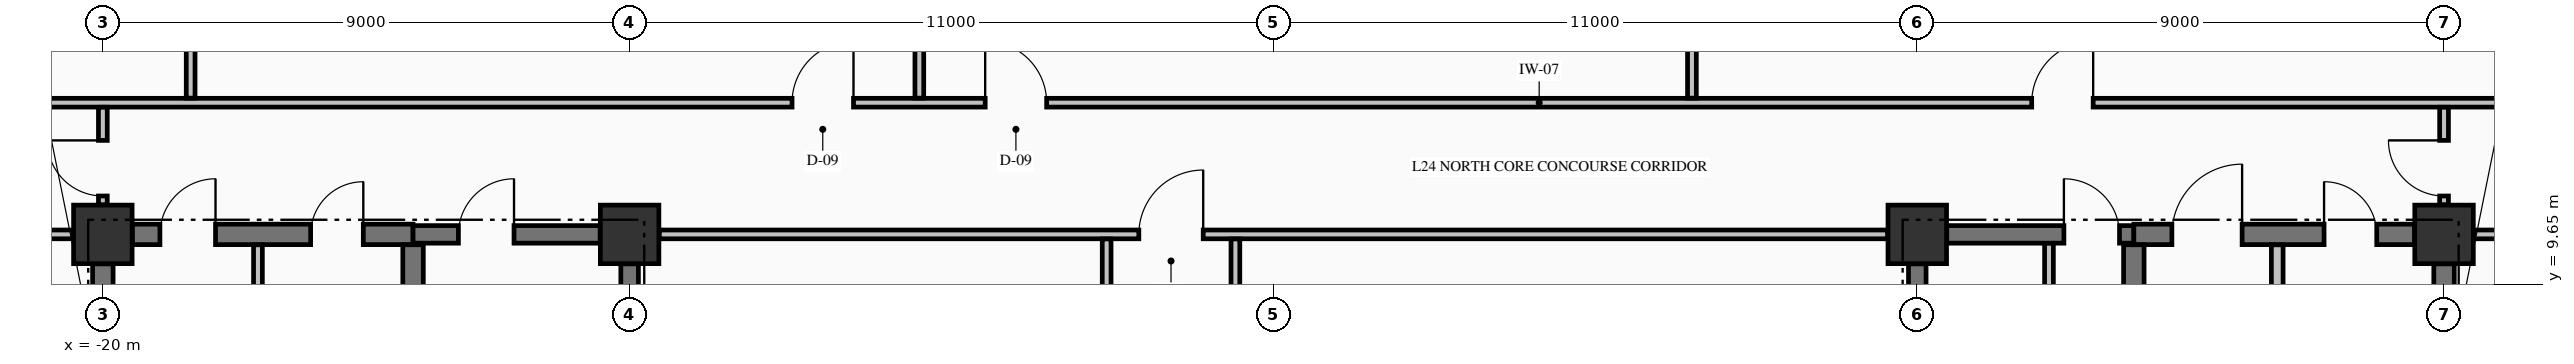
"""IFC4 building model, lengths in metres.
Left out: names, types, materials, properties, quantities, classifications, styles, units other than length and angle.
Written with IfcOpenShell. Run it as: python <this file> out.ifc"""

import sys

from ifc_helpers import new_model, si_unit, direction, frame, frame_2d, origin, origin_2d, place, context, subcontext, project, spatial, rectangle, extrude, element, fill, save


model = new_model("IFC4")
c1 = context("Model", 3, precision=1e-05, world=origin(), true_north=direction((0.0, 1.0)))
c2 = subcontext(c1, "Body", "Model", "MODEL_VIEW")
j1 = project(units=[si_unit("LENGTHUNIT", "METRE"), si_unit("PLANEANGLEUNIT", "RADIAN")], contexts=[c1])
p1 = place(None, origin())
s1 = spatial("IfcSite", under=j1, at=p1, CompositionType="ELEMENT")
p2 = place(p1, origin())
s2 = spatial("IfcBuilding", under=s1, at=p2, CompositionType="ELEMENT")
p3 = place(p2, frame((0.0, 0.0, 98.5)))
s3 = spatial("IfcBuildingStorey", under=s2, at=p3, CompositionType="ELEMENT", Elevation=98.5)
for number, where, z_axis, x_axis in (
    (1, (-20.0, 10.5, -0.275), (0.0, 0.0, 1.0), (1.0, 0.0, 0.0)),
    (2, (-11.0, 10.5, -0.275), (0.0, 0.0, 1.0), (1.0, 0.0, 0.0)),
    (3, (11.0, 10.5, -0.275), (0.0, 0.0, 1.0), (1.0, 0.0, 0.0)),
    (4, (20.0, 10.5, -0.275), (0.0, 0.0, 1.0), (1.0, 0.0, 0.0)),
):
    element("IfcColumn", number, at=place(p3, frame(where, z_axis=z_axis, x_axis=x_axis)), inside=s3, PredefinedType="COLUMN", context=c2, shape_type="SweptSolid", body=[
        extrude(rectangle(XDim=1.0, YDim=1.0, at=origin_2d()), origin(), (0.0, 0.0, 1.0), 3.595),
    ])
p4 = place(p3, frame((-19.496, 10.5, 0.0), z_axis=(0.0, 0.0, 1.0), x_axis=(1.0, 0.0, 0.0)))
e5 = element("IfcWall", 5, at=p4, inside=s3, PredefinedType="SHEAR", context=c2, shape_type="SweptSolid", body=[
    extrude(rectangle(XDim=4.796, YDim=0.35, at=frame_2d((2.398, 0.0))), origin(), (0.0, 0.0, 1.0), 3.32),
])
p5 = place(p4, frame((0.471, 0.0, 0.0)))
e6 = element("IfcOpeningElement", 6, at=p5, cuts=e5, PredefinedType="OPENING", context=c2, shape_type="SweptSolid", body=[
    extrude(rectangle(XDim=0.95, YDim=2.15, at=frame_2d((0.475, 1.075))), frame((0.0, 0.185, 0.0), z_axis=(0.0, -1.0, 0.0), x_axis=(1.0, 0.0, 0.0)), (0.0, 0.0, 1.0), 0.37),
])
p6 = place(p4, frame((3.046, 0.0, 0.0)))
e7 = element("IfcOpeningElement", 7, at=p6, cuts=e5, PredefinedType="OPENING", context=c2, shape_type="SweptSolid", body=[
    extrude(rectangle(XDim=0.9, YDim=2.15, at=frame_2d((0.45, 1.075))), frame((0.0, 0.185, 0.0), z_axis=(0.0, -1.0, 0.0), x_axis=(1.0, 0.0, 0.0)), (0.0, 0.0, 1.0), 0.37),
])
p7 = place(p3, frame((-14.7, 10.5, 0.0), z_axis=(0.0, 0.0, 1.0), x_axis=(1.0, 0.0, 0.0)))
e8 = element("IfcWall", 8, at=p7, inside=s3, PredefinedType="SHEAR", context=c2, shape_type="SweptSolid", body=[
    extrude(rectangle(XDim=3.196, YDim=0.3, at=frame_2d((1.598, 0.0))), origin(), (0.0, 0.0, 1.0), 3.32),
])
p8 = place(p7, frame((0.775, 0.0, 0.0)))
e9 = element("IfcOpeningElement", 9, at=p8, cuts=e8, PredefinedType="OPENING", context=c2, shape_type="SweptSolid", body=[
    extrude(rectangle(XDim=0.95, YDim=2.15, at=frame_2d((0.475, 1.075))), frame((0.0, 0.16, 0.0), z_axis=(0.0, -1.0, 0.0), x_axis=(1.0, 0.0, 0.0)), (0.0, 0.0, 1.0), 0.32),
])
p9 = place(p3, frame((11.504, 10.5, 0.0), z_axis=(0.0, 0.0, 1.0), x_axis=(1.0, 0.0, 0.0)))
e10 = element("IfcWall", 10, at=p9, inside=s3, PredefinedType="SHEAR", context=c2, shape_type="SweptSolid", body=[
    extrude(rectangle(XDim=3.196, YDim=0.3, at=frame_2d((1.598, 0.0))), origin(), (0.0, 0.0, 1.0), 3.32),
])
p10 = place(p9, frame((2.001, 0.0, 0.0)))
e11 = element("IfcOpeningElement", 11, at=p10, cuts=e10, PredefinedType="OPENING", context=c2, shape_type="SweptSolid", body=[
    extrude(rectangle(XDim=0.95, YDim=2.15, at=frame_2d((0.475, 1.075))), frame((0.0, 0.16, 0.0), z_axis=(0.0, -1.0, 0.0), x_axis=(1.0, 0.0, 0.0)), (0.0, 0.0, 1.0), 0.32),
])
p11 = place(p3, frame((14.7, 10.5, 0.0), z_axis=(0.0, 0.0, 1.0), x_axis=(1.0, 0.0, 0.0)))
e12 = element("IfcWall", 12, at=p11, inside=s3, PredefinedType="SHEAR", context=c2, shape_type="SweptSolid", body=[
    extrude(rectangle(XDim=4.796, YDim=0.35, at=frame_2d((2.398, 0.0))), origin(), (0.0, 0.0, 1.0), 3.32),
])
p12 = place(p11, frame((0.65, 0.0, 0.0)))
e13 = element("IfcOpeningElement", 13, at=p12, cuts=e12, PredefinedType="OPENING", context=c2, shape_type="SweptSolid", body=[
    extrude(rectangle(XDim=1.2, YDim=2.15, at=frame_2d((0.6, 1.075))), frame((0.0, 0.185, 0.0), z_axis=(0.0, -1.0, 0.0), x_axis=(1.0, 0.0, 0.0)), (0.0, 0.0, 1.0), 0.37),
])
p13 = place(p11, frame((3.25, 0.0, 0.0)))
e14 = element("IfcOpeningElement", 14, at=p13, cuts=e12, PredefinedType="OPENING", context=c2, shape_type="SweptSolid", body=[
    extrude(rectangle(XDim=0.9, YDim=2.15, at=frame_2d((0.45, 1.075))), frame((0.0, 0.185, 0.0), z_axis=(0.0, -1.0, 0.0), x_axis=(1.0, 0.0, 0.0)), (0.0, 0.0, 1.0), 0.37),
])
p14 = place(p3, frame((-22.835, 10.5, 0.0), z_axis=(0.0, 0.0, 1.0), x_axis=(1.0, 0.0, 0.0)))
e15 = element("IfcWall", 15, at=p14, inside=s3, PredefinedType="PARTITIONING", context=c2, shape_type="SweptSolid", body=[
    extrude(rectangle(XDim=2.329, YDim=0.15, at=frame_2d((1.165, 0.0))), origin(), (0.0, 0.0, 1.0), 3.32),
])
p15 = place(p14, frame((0.86, 0.0, 0.0)))
e16 = element("IfcOpeningElement", 16, at=p15, cuts=e15, PredefinedType="OPENING", context=c2, shape_type="SweptSolid", body=[
    extrude(rectangle(XDim=0.95, YDim=2.15, at=frame_2d((0.475, 1.075))), frame((0.0, 0.085, 0.0), z_axis=(0.0, -1.0, 0.0), x_axis=(1.0, 0.0, 0.0)), (0.0, 0.0, 1.0), 0.17),
])
p16 = place(p3, frame((-10.494, 10.5, 0.0), z_axis=(0.0, 0.0, 1.0), x_axis=(1.0, 0.0, 0.0)))
e17 = element("IfcWall", 17, at=p16, inside=s3, PredefinedType="PARTITIONING", context=c2, shape_type="SweptSolid", body=[
    extrude(rectangle(XDim=20.988, YDim=0.15, at=frame_2d((10.494, 0.0))), origin(), (0.0, 0.0, 1.0), 3.32),
])
p17 = place(p16, frame((8.194, 0.0, 0.0)))
e18 = element("IfcOpeningElement", 18, at=p17, cuts=e17, PredefinedType="OPENING", context=c2, shape_type="SweptSolid", body=[
    extrude(rectangle(XDim=1.1, YDim=2.15, at=frame_2d((0.55, 1.075))), frame((0.0, 0.085, 0.0), z_axis=(0.0, -1.0, 0.0), x_axis=(1.0, 0.0, 0.0)), (0.0, 0.0, 1.0), 0.17),
])
p18 = place(p3, frame((20.506, 10.5, 0.0), z_axis=(0.0, 0.0, 1.0), x_axis=(1.0, 0.0, 0.0)))
e19 = element("IfcWall", 19, at=p18, inside=s3, PredefinedType="PARTITIONING", context=c2, shape_type="SweptSolid", body=[
    extrude(rectangle(XDim=7.329, YDim=0.15, at=frame_2d((3.665, 0.0))), origin(), (0.0, 0.0, 1.0), 3.32),
])
p19 = place(p18, frame((2.994, 0.0, 0.0)))
e20 = element("IfcOpeningElement", 20, at=p19, cuts=e19, PredefinedType="OPENING", context=c2, shape_type="SweptSolid", body=[
    extrude(rectangle(XDim=1.0, YDim=2.15, at=frame_2d((0.5, 1.075))), frame((0.0, 0.085, 0.0), z_axis=(0.0, -1.0, 0.0), x_axis=(1.0, 0.0, 0.0)), (0.0, 0.0, 1.0), 0.17),
])
p20 = place(p3, frame((-22.835, 12.75, 0.0), z_axis=(0.0, 0.0, 1.0), x_axis=(1.0, 0.0, 0.0)))
e21 = element("IfcWall", 21, at=p20, inside=s3, PredefinedType="PARTITIONING", context=c2, shape_type="SweptSolid", body=[
    extrude(rectangle(XDim=50.67, YDim=0.15, at=frame_2d((25.335, 0.0))), origin(), (0.0, 0.0, 1.0), 3.32),
])
p21 = place(p20, frame((14.61, 0.0, 0.0)))
e22 = element("IfcOpeningElement", 22, at=p21, cuts=e21, PredefinedType="OPENING", context=c2, shape_type="SweptSolid", body=[
    extrude(rectangle(XDim=1.05, YDim=2.15, at=frame_2d((0.525, 1.075))), frame((0.0, 0.085, 0.0), z_axis=(0.0, -1.0, 0.0), x_axis=(1.0, 0.0, 0.0)), (0.0, 0.0, 1.0), 0.17),
])
p22 = place(p20, frame((17.91, 0.0, 0.0)))
e23 = element("IfcOpeningElement", 23, at=p22, cuts=e21, PredefinedType="OPENING", context=c2, shape_type="SweptSolid", body=[
    extrude(rectangle(XDim=1.05, YDim=2.15, at=frame_2d((0.525, 1.075))), frame((0.0, 0.085, 0.0), z_axis=(0.0, -1.0, 0.0), x_axis=(1.0, 0.0, 0.0)), (0.0, 0.0, 1.0), 0.17),
])
p23 = place(p20, frame((35.79, 0.0, 0.0)))
e24 = element("IfcOpeningElement", 24, at=p23, cuts=e21, PredefinedType="OPENING", context=c2, shape_type="SweptSolid", body=[
    extrude(rectangle(XDim=1.05, YDim=2.15, at=frame_2d((0.525, 1.075))), frame((0.0, 0.085, 0.0), z_axis=(0.0, -1.0, 0.0), x_axis=(1.0, 0.0, 0.0)), (0.0, 0.0, 1.0), 0.17),
])
p24 = place(p3, frame((-20.0, 0.504, 0.0), z_axis=(0.0, 0.0, 1.0), x_axis=(0.0, 1.0, 0.0)))
e25 = element("IfcWall", 25, at=p24, inside=s3, PredefinedType="SHEAR", context=c2, shape_type="SweptSolid", body=[
    extrude(rectangle(XDim=9.492, YDim=0.35, at=frame_2d((4.746, 0.0))), origin(), (0.0, 0.0, 1.0), 3.32),
])
p25 = place(p3, frame((-14.7, 5.852, 0.0), z_axis=(0.0, 0.0, 1.0), x_axis=(0.0, 1.0, 0.0)))
e26 = element("IfcWall", 26, at=p25, inside=s3, PredefinedType="SHEAR", context=c2, shape_type="SweptSolid", body=[
    extrude(rectangle(XDim=4.471, YDim=0.35, at=frame_2d((2.235, 0.0))), origin(), (0.0, 0.0, 1.0), 3.32),
])
for number, where, z_axis, x_axis in (
    (27, (-11.0, 5.852, 0.0), (0.0, 0.0, 1.0), (0.0, 1.0, 0.0)),
    (28, (11.0, 5.852, 0.0), (0.0, 0.0, 1.0), (0.0, 1.0, 0.0)),
):
    element("IfcWall", number, at=place(p3, frame(where, z_axis=z_axis, x_axis=x_axis)), inside=s3, PredefinedType="SHEAR", context=c2, shape_type="SweptSolid", body=[
        extrude(rectangle(XDim=4.144, YDim=0.3, at=frame_2d((2.072, 0.0))), origin(), (0.0, 0.0, 1.0), 3.32),
    ])
p26 = place(p3, frame((14.7, 5.852, 0.0), z_axis=(0.0, 0.0, 1.0), x_axis=(0.0, 1.0, 0.0)))
e29 = element("IfcWall", 29, at=p26, inside=s3, PredefinedType="SHEAR", context=c2, shape_type="SweptSolid", body=[
    extrude(rectangle(XDim=4.471, YDim=0.35, at=frame_2d((2.235, 0.0))), origin(), (0.0, 0.0, 1.0), 3.32),
])
p27 = place(p3, frame((20.0, 5.377, 0.0), z_axis=(0.0, 0.0, 1.0), x_axis=(0.0, 1.0, 0.0)))
e30 = element("IfcWall", 30, at=p27, inside=s3, PredefinedType="SHEAR", context=c2, shape_type="SweptSolid", body=[
    extrude(rectangle(XDim=4.619, YDim=0.35, at=frame_2d((2.31, 0.0))), origin(), (0.0, 0.0, 1.0), 3.32),
])
p28 = place(p3, frame((-20.0, 11.006, 0.0), z_axis=(0.0, 0.0, 1.0), x_axis=(0.0, 1.0, 0.0)))
e31 = element("IfcWall", 31, at=p28, inside=s3, PredefinedType="PARTITIONING", context=c2, shape_type="SweptSolid", body=[
    extrude(rectangle(XDim=1.666, YDim=0.15, at=frame_2d((0.833, 0.0))), origin(), (0.0, 0.0, 1.0), 2.81),
])
p29 = place(p28, frame((0.15, 0.0, 0.0)))
e32 = element("IfcOpeningElement", 32, at=p29, cuts=e31, PredefinedType="OPENING", context=c2, shape_type="SweptSolid", body=[
    extrude(rectangle(XDim=0.95, YDim=2.15, at=frame_2d((0.475, 1.075))), frame((0.0, 0.085, 0.0), z_axis=(0.0, -1.0, 0.0), x_axis=(1.0, 0.0, 0.0)), (0.0, 0.0, 1.0), 0.17),
])
p30 = place(p3, frame((-18.5, 12.828, 0.0), z_axis=(0.0, 0.0, 1.0), x_axis=(0.0, 1.0, 0.0)))
e33 = element("IfcWall", 33, at=p30, inside=s3, PredefinedType="PARTITIONING", context=c2, shape_type="SweptSolid", body=[
    extrude(rectangle(XDim=7.566, YDim=0.15, at=frame_2d((3.783, 0.0))), origin(), (0.0, 0.0, 1.0), 3.32),
])
p31 = place(p3, frame((-17.35, 5.178, 0.0), z_axis=(0.0, 0.0, 1.0), x_axis=(0.0, 1.0, 0.0)))
e34 = element("IfcWall", 34, at=p31, inside=s3, PredefinedType="PARTITIONING", context=c2, shape_type="SweptSolid", body=[
    extrude(rectangle(XDim=5.144, YDim=0.15, at=frame_2d((2.572, 0.0))), origin(), (0.0, 0.0, 1.0), 3.32),
])
p32 = place(p3, frame((-6.05, 12.828, 0.0), z_axis=(0.0, 0.0, 1.0), x_axis=(0.0, 1.0, 0.0)))
e35 = element("IfcWall", 35, at=p32, inside=s3, PredefinedType="PARTITIONING", context=c2, shape_type="SweptSolid", body=[
    extrude(rectangle(XDim=12.507, YDim=0.15, at=frame_2d((6.253, 0.0))), origin(), (0.0, 0.0, 1.0), 3.32),
])
for number, where, z_axis, x_axis in (
    (36, (-2.85, 2.978, 0.0), (0.0, 0.0, 1.0), (0.0, 1.0, 0.0)),
    (37, (-0.65, 2.978, 0.0), (0.0, 0.0, 1.0), (0.0, 1.0, 0.0)),
):
    element("IfcWall", number, at=place(p3, frame(where, z_axis=z_axis, x_axis=x_axis)), inside=s3, PredefinedType="PARTITIONING", context=c2, shape_type="SweptSolid", body=[
        extrude(rectangle(XDim=7.444, YDim=0.15, at=frame_2d((3.722, 0.0))), origin(), (0.0, 0.0, 1.0), 3.32),
    ])
p33 = place(p3, frame((7.15, 12.828, 0.0), z_axis=(0.0, 0.0, 1.0), x_axis=(0.0, 1.0, 0.0)))
e38 = element("IfcWall", 38, at=p33, inside=s3, PredefinedType="PARTITIONING", context=c2, shape_type="SweptSolid", body=[
    extrude(rectangle(XDim=12.507, YDim=0.15, at=frame_2d((6.253, 0.0))), origin(), (0.0, 0.0, 1.0), 3.32),
])
p34 = place(p3, frame((13.25, 5.853, 0.0), z_axis=(0.0, 0.0, 1.0), x_axis=(0.0, 1.0, 0.0)))
e39 = element("IfcWall", 39, at=p34, inside=s3, PredefinedType="PARTITIONING", context=c2, shape_type="SweptSolid", body=[
    extrude(rectangle(XDim=4.494, YDim=0.15, at=frame_2d((2.247, 0.0))), origin(), (0.0, 0.0, 1.0), 3.32),
])
p35 = place(p34, frame((1.472, 0.0, 0.0)))
e40 = element("IfcOpeningElement", 40, at=p35, cuts=e39, PredefinedType="OPENING", context=c2, shape_type="SweptSolid", body=[
    extrude(rectangle(XDim=0.95, YDim=2.15, at=frame_2d((0.475, 1.075))), frame((0.0, 0.085, 0.0), z_axis=(0.0, -1.0, 0.0), x_axis=(1.0, 0.0, 0.0)), (0.0, 0.0, 1.0), 0.17),
])
p36 = place(p3, frame((17.15, 5.378, 0.0), z_axis=(0.0, 0.0, 1.0), x_axis=(0.0, 1.0, 0.0)))
e41 = element("IfcWall", 41, at=p36, inside=s3, PredefinedType="PARTITIONING", context=c2, shape_type="SweptSolid", body=[
    extrude(rectangle(XDim=4.944, YDim=0.2, at=frame_2d((2.472, 0.0))), origin(), (0.0, 0.0, 1.0), 3.32),
])
p37 = place(p3, frame((20.0, 11.006, 0.0), z_axis=(0.0, 0.0, 1.0), x_axis=(0.0, 1.0, 0.0)))
e42 = element("IfcWall", 42, at=p37, inside=s3, PredefinedType="PARTITIONING", context=c2, shape_type="SweptSolid", body=[
    extrude(rectangle(XDim=1.666, YDim=0.15, at=frame_2d((0.833, 0.0))), origin(), (0.0, 0.0, 1.0), 2.81),
])
p38 = place(p37, frame((0.15, 0.0, 0.0)))
e43 = element("IfcOpeningElement", 43, at=p38, cuts=e42, PredefinedType="OPENING", context=c2, shape_type="SweptSolid", body=[
    extrude(rectangle(XDim=0.95, YDim=2.15, at=frame_2d((0.475, 1.075))), frame((0.0, 0.085, 0.0), z_axis=(0.0, -1.0, 0.0), x_axis=(1.0, 0.0, 0.0)), (0.0, 0.0, 1.0), 0.17),
])
p39 = place(p8, origin())
e44 = element("IfcDoor", 44, at=p39, inside=s3, OperationType="SINGLE_SWING_RIGHT", PredefinedType="DOOR", context=c2, shape_type="SweptSolid", body=[
    extrude(rectangle(XDim=0.95, YDim=2.15, at=frame_2d((0.475, 1.075))), frame((0.0, 0.025, 0.0), z_axis=(0.0, -1.0, 0.0), x_axis=(1.0, 0.0, 0.0)), (0.0, 0.0, 1.0), 0.05),
])
fill(e9, e44)
p40 = place(p10, origin())
e45 = element("IfcDoor", 45, at=p40, inside=s3, OperationType="SINGLE_SWING_LEFT", PredefinedType="DOOR", context=c2, shape_type="SweptSolid", body=[
    extrude(rectangle(XDim=0.95, YDim=2.15, at=frame_2d((0.475, 1.075))), frame((0.0, 0.025, 0.0), z_axis=(0.0, -1.0, 0.0), x_axis=(1.0, 0.0, 0.0)), (0.0, 0.0, 1.0), 0.05),
])
fill(e11, e45)
p41 = place(p5, origin())
e46 = element("IfcDoor", 46, at=p41, inside=s3, OperationType="SINGLE_SWING_RIGHT", PredefinedType="DOOR", context=c2, shape_type="SweptSolid", body=[
    extrude(rectangle(XDim=0.95, YDim=2.15, at=frame_2d((0.475, 1.075))), frame((0.0, 0.025, 0.0), z_axis=(0.0, -1.0, 0.0), x_axis=(1.0, 0.0, 0.0)), (0.0, 0.0, 1.0), 0.05),
])
fill(e6, e46)
p42 = place(p6, origin())
e47 = element("IfcDoor", 47, at=p42, inside=s3, OperationType="SINGLE_SWING_RIGHT", PredefinedType="DOOR", context=c2, shape_type="SweptSolid", body=[
    extrude(rectangle(XDim=0.9, YDim=2.15, at=frame_2d((0.45, 1.075))), frame((0.0, 0.025, 0.0), z_axis=(0.0, -1.0, 0.0), x_axis=(1.0, 0.0, 0.0)), (0.0, 0.0, 1.0), 0.05),
])
fill(e7, e47)
p43 = place(p12, origin())
e48 = element("IfcDoor", 48, at=p43, inside=s3, OperationType="SINGLE_SWING_RIGHT", PredefinedType="DOOR", context=c2, shape_type="SweptSolid", body=[
    extrude(rectangle(XDim=1.2, YDim=2.15, at=frame_2d((0.6, 1.075))), frame((0.0, 0.025, 0.0), z_axis=(0.0, -1.0, 0.0), x_axis=(1.0, 0.0, 0.0)), (0.0, 0.0, 1.0), 0.05),
])
fill(e13, e48)
p44 = place(p13, origin())
e49 = element("IfcDoor", 49, at=p44, inside=s3, OperationType="SINGLE_SWING_LEFT", PredefinedType="DOOR", context=c2, shape_type="SweptSolid", body=[
    extrude(rectangle(XDim=0.9, YDim=2.15, at=frame_2d((0.45, 1.075))), frame((0.0, 0.025, 0.0), z_axis=(0.0, -1.0, 0.0), x_axis=(1.0, 0.0, 0.0)), (0.0, 0.0, 1.0), 0.05),
])
fill(e14, e49)
p45 = place(p17, origin())
e50 = element("IfcDoor", 50, at=p45, inside=s3, OperationType="SINGLE_SWING_RIGHT", PredefinedType="DOOR", context=c2, shape_type="SweptSolid", body=[
    extrude(rectangle(XDim=1.1, YDim=2.15, at=frame_2d((0.55, 1.075))), frame((0.0, 0.025, 0.0), z_axis=(0.0, -1.0, 0.0), x_axis=(1.0, 0.0, 0.0)), (0.0, 0.0, 1.0), 0.05),
])
fill(e18, e50)
p46 = place(p21, origin())
e51 = element("IfcDoor", 51, at=p46, inside=s3, OperationType="SINGLE_SWING_RIGHT", PredefinedType="DOOR", context=c2, shape_type="SweptSolid", body=[
    extrude(rectangle(XDim=1.05, YDim=2.15, at=frame_2d((0.525, 1.075))), frame((0.0, 0.025, 0.0), z_axis=(0.0, -1.0, 0.0), x_axis=(1.0, 0.0, 0.0)), (0.0, 0.0, 1.0), 0.05),
])
fill(e22, e51)
p47 = place(p22, origin())
e52 = element("IfcDoor", 52, at=p47, inside=s3, OperationType="SINGLE_SWING_LEFT", PredefinedType="DOOR", context=c2, shape_type="SweptSolid", body=[
    extrude(rectangle(XDim=1.05, YDim=2.15, at=frame_2d((0.525, 1.075))), frame((0.0, 0.025, 0.0), z_axis=(0.0, -1.0, 0.0), x_axis=(1.0, 0.0, 0.0)), (0.0, 0.0, 1.0), 0.05),
])
fill(e23, e52)
p48 = place(p23, origin())
e53 = element("IfcDoor", 53, at=p48, inside=s3, OperationType="SINGLE_SWING_RIGHT", PredefinedType="DOOR", context=c2, shape_type="SweptSolid", body=[
    extrude(rectangle(XDim=1.05, YDim=2.15, at=frame_2d((0.525, 1.075))), frame((0.0, 0.025, 0.0), z_axis=(0.0, -1.0, 0.0), x_axis=(1.0, 0.0, 0.0)), (0.0, 0.0, 1.0), 0.05),
])
fill(e24, e53)
p49 = place(p29, origin())
e54 = element("IfcDoor", 54, at=p49, inside=s3, OperationType="SINGLE_SWING_RIGHT", PredefinedType="DOOR", context=c2, shape_type="SweptSolid", body=[
    extrude(rectangle(XDim=0.95, YDim=2.15, at=frame_2d((0.475, 1.075))), frame((0.0, 0.025, 0.0), z_axis=(0.0, -1.0, 0.0), x_axis=(1.0, 0.0, 0.0)), (0.0, 0.0, 1.0), 0.05),
])
fill(e32, e54)
p50 = place(p38, origin())
e55 = element("IfcDoor", 55, at=p50, inside=s3, OperationType="SINGLE_SWING_RIGHT", PredefinedType="DOOR", context=c2, shape_type="SweptSolid", body=[
    extrude(rectangle(XDim=0.95, YDim=2.15, at=frame_2d((0.475, 1.075))), frame((0.0, 0.025, 0.0), z_axis=(0.0, -1.0, 0.0), x_axis=(1.0, 0.0, 0.0)), (0.0, 0.0, 1.0), 0.05),
])
fill(e43, e55)
save(model, sys.argv[1])
